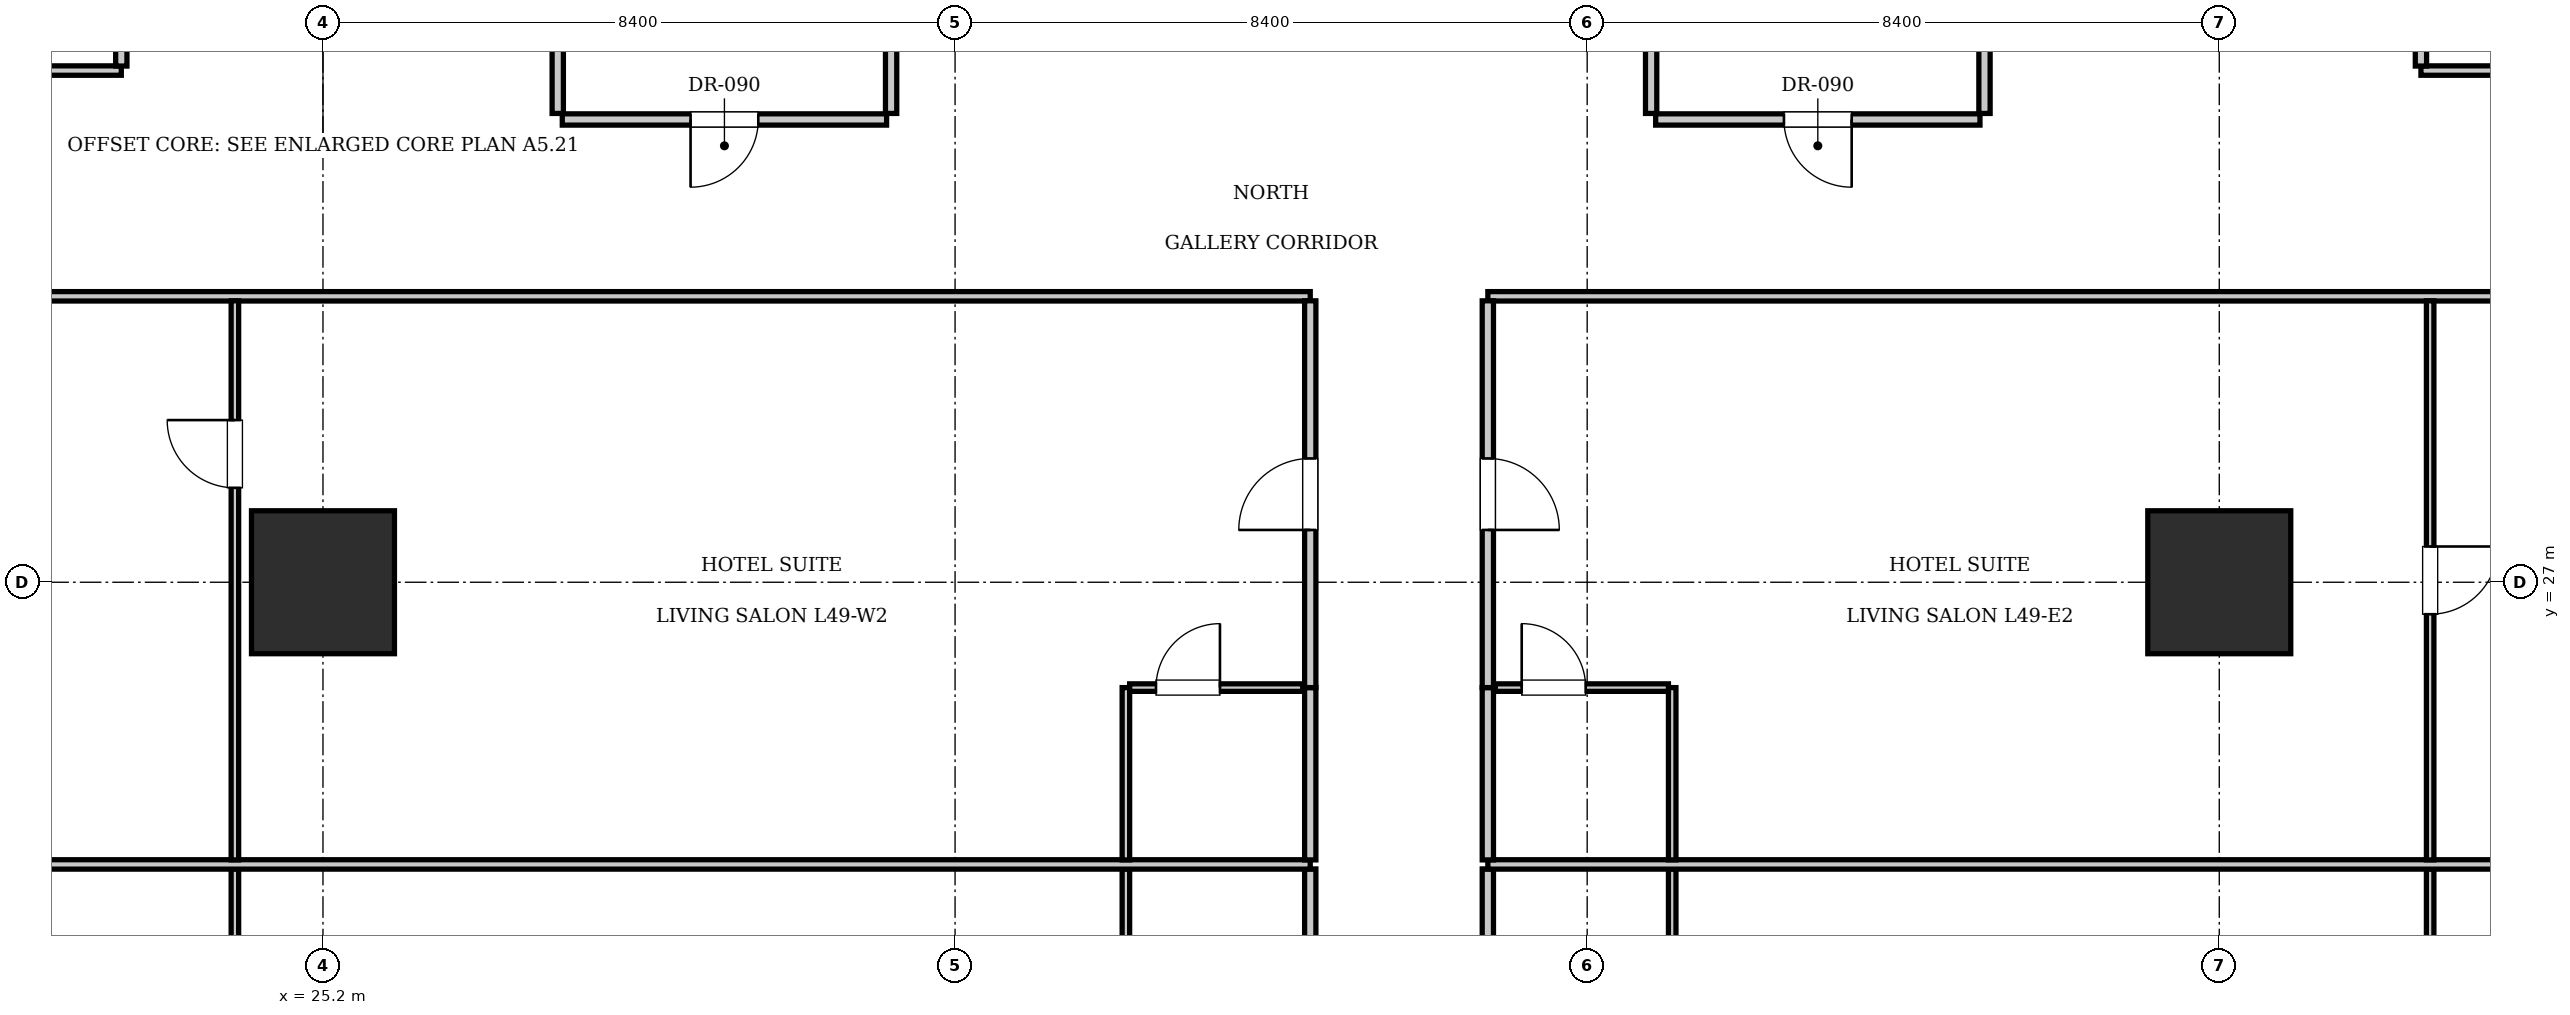
"""IFC4 building model, lengths in metres.
Left out: names, types, materials, properties, quantities, classifications, styles, units other than length and angle.
Written with IfcOpenShell. Run it as: python <this file> out.ifc"""

import sys

from ifc_helpers import new_model, si_unit, direction, frame, frame_2d, origin, origin_2d, place, context, subcontext, project, spatial, rectangle, extrude, element, fill, save


model = new_model("IFC4")
c1 = context("Model", 3, precision=1e-05, world=origin(), true_north=direction((0.0, 1.0)))
c2 = subcontext(c1, "Body", "Model", "MODEL_VIEW")
j1 = project(units=[si_unit("LENGTHUNIT", "METRE"), si_unit("PLANEANGLEUNIT", "RADIAN")], contexts=[c1])
p1 = place(None, origin())
s1 = spatial("IfcSite", under=j1, at=p1, CompositionType="ELEMENT")
p2 = place(p1, origin())
s2 = spatial("IfcBuilding", under=s1, at=p2, CompositionType="ELEMENT")
p3 = place(p2, frame((0.0, 0.0, 200.55)))
s3 = spatial("IfcBuildingStorey", under=s2, at=p3, CompositionType="ELEMENT", Elevation=200.55)
for number, where, z_axis, x_axis in (
    (1, (25.2, 27.0, 0.0), (0.0, 0.0, 1.0), (1.0, 0.0, 0.0)),
    (2, (50.4, 27.0, 0.0), (0.0, 0.0, 1.0), (1.0, 0.0, 0.0)),
):
    element("IfcColumn", number, at=place(p3, frame(where, z_axis=z_axis, x_axis=x_axis)), inside=s3, PredefinedType="COLUMN", context=c2, shape_type="SweptSolid", body=[
        extrude(rectangle(XDim=1.9, YDim=1.9, at=origin_2d()), origin(), (0.0, 0.0, 1.0), 3.85),
    ])
for number, where, z_axis, x_axis in (
    (3, (28.32, 33.23, 0.0), (0.0, 0.0, 1.0), (0.0, 1.0, 0.0)),
    (4, (32.75, 33.23, 0.0), (0.0, 0.0, 1.0), (0.0, 1.0, 0.0)),
):
    element("IfcWall", number, at=place(p3, frame(where, z_axis=z_axis, x_axis=x_axis)), inside=s3, PredefinedType="PARTITIONING", context=c2, shape_type="SweptSolid", body=[
        extrude(rectangle(XDim=2.89, YDim=0.15, at=frame_2d((1.445, 0.0))), origin(), (0.0, 0.0, 1.0), 3.61),
    ])
p4 = place(p3, frame((28.38, 33.15, 0.0), z_axis=(0.0, 0.0, 1.0), x_axis=(1.0, 0.0, 0.0)))
e5 = element("IfcWall", 5, at=p4, inside=s3, PredefinedType="PARTITIONING", context=c2, shape_type="SweptSolid", body=[
    extrude(rectangle(XDim=4.31, YDim=0.15, at=frame_2d((2.155, 0.0))), origin(), (0.0, 0.0, 1.0), 3.61),
])
p5 = place(p4, frame((1.705, 0.0, 0.0)))
e6 = element("IfcOpeningElement", 6, at=p5, cuts=e5, PredefinedType="OPENING", context=c2, shape_type="SweptSolid", body=[
    extrude(rectangle(XDim=0.9, YDim=2.1, at=frame_2d((0.45, 1.05))), frame((0.0, 0.085, 0.0), z_axis=(0.0, -1.0, 0.0), x_axis=(1.0, 0.0, 0.0)), (0.0, 0.0, 1.0), 0.17),
])
for number, where, z_axis, x_axis in (
    (7, (42.85, 33.23, 0.0), (0.0, 0.0, 1.0), (0.0, 1.0, 0.0)),
    (8, (47.28, 33.23, 0.0), (0.0, 0.0, 1.0), (0.0, 1.0, 0.0)),
):
    element("IfcWall", number, at=place(p3, frame(where, z_axis=z_axis, x_axis=x_axis)), inside=s3, PredefinedType="PARTITIONING", context=c2, shape_type="SweptSolid", body=[
        extrude(rectangle(XDim=2.89, YDim=0.15, at=frame_2d((1.445, 0.0))), origin(), (0.0, 0.0, 1.0), 3.61),
    ])
p6 = place(p3, frame((42.91, 33.15, 0.0), z_axis=(0.0, 0.0, 1.0), x_axis=(1.0, 0.0, 0.0)))
e9 = element("IfcWall", 9, at=p6, inside=s3, PredefinedType="PARTITIONING", context=c2, shape_type="SweptSolid", body=[
    extrude(rectangle(XDim=4.31, YDim=0.15, at=frame_2d((2.155, 0.0))), origin(), (0.0, 0.0, 1.0), 3.61),
])
p7 = place(p6, frame((1.705, 0.0, 0.0)))
e10 = element("IfcOpeningElement", 10, at=p7, cuts=e9, PredefinedType="OPENING", context=c2, shape_type="SweptSolid", body=[
    extrude(rectangle(XDim=0.9, YDim=2.1, at=frame_2d((0.45, 1.05))), frame((0.0, 0.085, 0.0), z_axis=(0.0, -1.0, 0.0), x_axis=(1.0, 0.0, 0.0)), (0.0, 0.0, 1.0), 0.17),
])
p8 = place(p3, frame((13.2, 30.8, 0.0), z_axis=(0.0, 0.0, 1.0), x_axis=(1.0, 0.0, 0.0)))
e11 = element("IfcWall", 11, at=p8, inside=s3, PredefinedType="PARTITIONING", context=c2, shape_type="SweptSolid", body=[
    extrude(rectangle(XDim=25.12, YDim=0.125, at=frame_2d((12.56, 0.0))), origin(), (0.0, 0.0, 1.0), 3.61),
])
p9 = place(p3, frame((40.68, 30.8, 0.0), z_axis=(0.0, 0.0, 1.0), x_axis=(1.0, 0.0, 0.0)))
e12 = element("IfcWall", 12, at=p9, inside=s3, PredefinedType="PARTITIONING", context=c2, shape_type="SweptSolid", body=[
    extrude(rectangle(XDim=21.72, YDim=0.125, at=frame_2d((10.86, 0.0))), origin(), (0.0, 0.0, 1.0), 3.61),
])
p10 = place(p3, frame((38.32, 20.9, 0.0), z_axis=(0.0, 0.0, 1.0), x_axis=(0.0, 1.0, 0.0)))
e13 = element("IfcWall", 13, at=p10, inside=s3, PredefinedType="PARTITIONING", context=c2, shape_type="SweptSolid", body=[
    extrude(rectangle(XDim=2.29, YDim=0.15, at=frame_2d((1.145, 0.0))), origin(), (0.0, 0.0, 1.0), 3.61),
])
p11 = place(p3, frame((35.87, 20.9, 0.0), z_axis=(0.0, 0.0, 1.0), x_axis=(0.0, 1.0, 0.0)))
e14 = element("IfcWall", 14, at=p11, inside=s3, PredefinedType="PARTITIONING", context=c2, shape_type="SweptSolid", body=[
    extrude(rectangle(XDim=2.29, YDim=0.1, at=frame_2d((1.145, 0.0))), origin(), (0.0, 0.0, 1.0), 3.61),
])
p12 = place(p3, frame((24.03, 15.76, 0.0), z_axis=(0.0, 0.0, 1.0), x_axis=(0.0, 1.0, 0.0)))
e15 = element("IfcWall", 15, at=p12, inside=s3, PredefinedType="PARTITIONING", context=c2, shape_type="SweptSolid", body=[
    extrude(rectangle(XDim=7.43, YDim=0.1, at=frame_2d((3.715, 0.0))), origin(), (0.0, 0.0, 1.0), 3.61),
])
p13 = place(p12, frame((3.265, 0.0, 0.0)))
e16 = element("IfcOpeningElement", 16, at=p13, cuts=e15, PredefinedType="OPENING", context=c2, shape_type="SweptSolid", body=[
    extrude(rectangle(XDim=0.9, YDim=2.1, at=frame_2d((0.45, 1.05))), frame((0.0, 0.06, 0.0), z_axis=(0.0, -1.0, 0.0), x_axis=(1.0, 0.0, 0.0)), (0.0, 0.0, 1.0), 0.12),
])
p14 = place(p3, frame((40.68, 20.9, 0.0), z_axis=(0.0, 0.0, 1.0), x_axis=(0.0, 1.0, 0.0)))
e17 = element("IfcWall", 17, at=p14, inside=s3, PredefinedType="PARTITIONING", context=c2, shape_type="SweptSolid", body=[
    extrude(rectangle(XDim=2.29, YDim=0.15, at=frame_2d((1.145, 0.0))), origin(), (0.0, 0.0, 1.0), 3.61),
])
p15 = place(p3, frame((43.13, 20.9, 0.0), z_axis=(0.0, 0.0, 1.0), x_axis=(0.0, 1.0, 0.0)))
e18 = element("IfcWall", 18, at=p15, inside=s3, PredefinedType="PARTITIONING", context=c2, shape_type="SweptSolid", body=[
    extrude(rectangle(XDim=2.29, YDim=0.1, at=frame_2d((1.145, 0.0))), origin(), (0.0, 0.0, 1.0), 3.61),
])
p16 = place(p3, frame((53.202, 15.76, 0.0), z_axis=(0.0, 0.0, 1.0), x_axis=(0.0, 1.0, 0.0)))
e19 = element("IfcWall", 19, at=p16, inside=s3, PredefinedType="PARTITIONING", context=c2, shape_type="SweptSolid", body=[
    extrude(rectangle(XDim=7.43, YDim=0.1, at=frame_2d((3.715, 0.0))), origin(), (0.0, 0.0, 1.0), 3.61),
])
p17 = place(p16, frame((3.265, 0.0, 0.0)))
e20 = element("IfcOpeningElement", 20, at=p17, cuts=e19, PredefinedType="OPENING", context=c2, shape_type="SweptSolid", body=[
    extrude(rectangle(XDim=0.9, YDim=2.1, at=frame_2d((0.45, 1.05))), frame((0.0, 0.06, 0.0), z_axis=(0.0, -1.0, 0.0), x_axis=(1.0, 0.0, 0.0)), (0.0, 0.0, 1.0), 0.12),
])
p18 = place(p3, frame((13.2, 23.25, 0.0), z_axis=(0.0, 0.0, 1.0), x_axis=(1.0, 0.0, 0.0)))
e21 = element("IfcWall", 21, at=p18, inside=s3, PredefinedType="PARTITIONING", context=c2, shape_type="SweptSolid", body=[
    extrude(rectangle(XDim=25.12, YDim=0.125, at=frame_2d((12.56, 0.0))), origin(), (0.0, 0.0, 1.0), 3.61),
])
p19 = place(p3, frame((40.68, 23.25, 0.0), z_axis=(0.0, 0.0, 1.0), x_axis=(1.0, 0.0, 0.0)))
e22 = element("IfcWall", 22, at=p19, inside=s3, PredefinedType="PARTITIONING", context=c2, shape_type="SweptSolid", body=[
    extrude(rectangle(XDim=21.72, YDim=0.125, at=frame_2d((10.86, 0.0))), origin(), (0.0, 0.0, 1.0), 3.61),
])
p20 = place(p3, frame((38.32, 23.31, 0.0), z_axis=(0.0, 0.0, 1.0), x_axis=(0.0, 1.0, 0.0)))
e23 = element("IfcWall", 23, at=p20, inside=s3, PredefinedType="PARTITIONING", context=c2, shape_type="SweptSolid", body=[
    extrude(rectangle(XDim=2.29, YDim=0.15, at=frame_2d((1.145, 0.0))), origin(), (0.0, 0.0, 1.0), 3.61),
])
p21 = place(p3, frame((38.32, 25.6, 0.0), z_axis=(0.0, 0.0, 1.0), x_axis=(0.0, 1.0, 0.0)))
e24 = element("IfcWall", 24, at=p21, inside=s3, PredefinedType="PARTITIONING", context=c2, shape_type="SweptSolid", body=[
    extrude(rectangle(XDim=5.14, YDim=0.15, at=frame_2d((2.57, 0.0))), origin(), (0.0, 0.0, 1.0), 3.61),
])
p22 = place(p21, frame((2.095, 0.0, 0.0)))
e25 = element("IfcOpeningElement", 25, at=p22, cuts=e24, PredefinedType="OPENING", context=c2, shape_type="SweptSolid", body=[
    extrude(rectangle(XDim=0.95, YDim=2.15, at=frame_2d((0.475, 1.075))), frame((0.0, 0.085, 0.0), z_axis=(0.0, -1.0, 0.0), x_axis=(1.0, 0.0, 0.0)), (0.0, 0.0, 1.0), 0.17),
])
p23 = place(p3, frame((35.87, 23.31, 0.0), z_axis=(0.0, 0.0, 1.0), x_axis=(0.0, 1.0, 0.0)))
e26 = element("IfcWall", 26, at=p23, inside=s3, PredefinedType="PARTITIONING", context=c2, shape_type="SweptSolid", body=[
    extrude(rectangle(XDim=2.29, YDim=0.1, at=frame_2d((1.145, 0.0))), origin(), (0.0, 0.0, 1.0), 3.61),
])
p24 = place(p3, frame((35.92, 25.6, 0.0), z_axis=(0.0, 0.0, 1.0), x_axis=(1.0, 0.0, 0.0)))
e27 = element("IfcWall", 27, at=p24, inside=s3, PredefinedType="PARTITIONING", context=c2, shape_type="SweptSolid", body=[
    extrude(rectangle(XDim=2.3, YDim=0.1, at=frame_2d((1.15, 0.0))), origin(), (0.0, 0.0, 1.0), 3.61),
])
p25 = place(p24, frame((0.35, 0.0, 0.0)))
e28 = element("IfcOpeningElement", 28, at=p25, cuts=e27, PredefinedType="OPENING", context=c2, shape_type="SweptSolid", body=[
    extrude(rectangle(XDim=0.85, YDim=2.1, at=frame_2d((0.425, 1.05))), frame((0.0, 0.06, 0.0), z_axis=(0.0, -1.0, 0.0), x_axis=(1.0, 0.0, 0.0)), (0.0, 0.0, 1.0), 0.12),
])
p26 = place(p3, frame((24.03, 23.31, 0.0), z_axis=(0.0, 0.0, 1.0), x_axis=(0.0, 1.0, 0.0)))
e29 = element("IfcWall", 29, at=p26, inside=s3, PredefinedType="PARTITIONING", context=c2, shape_type="SweptSolid", body=[
    extrude(rectangle(XDim=7.43, YDim=0.1, at=frame_2d((3.715, 0.0))), origin(), (0.0, 0.0, 1.0), 3.61),
])
p27 = place(p26, frame((4.945, 0.0, 0.0)))
e30 = element("IfcOpeningElement", 30, at=p27, cuts=e29, PredefinedType="OPENING", context=c2, shape_type="SweptSolid", body=[
    extrude(rectangle(XDim=0.9, YDim=2.1, at=frame_2d((0.45, 1.05))), frame((0.0, 0.06, 0.0), z_axis=(0.0, -1.0, 0.0), x_axis=(1.0, 0.0, 0.0)), (0.0, 0.0, 1.0), 0.12),
])
p28 = place(p3, frame((40.68, 23.31, 0.0), z_axis=(0.0, 0.0, 1.0), x_axis=(0.0, 1.0, 0.0)))
e31 = element("IfcWall", 31, at=p28, inside=s3, PredefinedType="PARTITIONING", context=c2, shape_type="SweptSolid", body=[
    extrude(rectangle(XDim=2.29, YDim=0.15, at=frame_2d((1.145, 0.0))), origin(), (0.0, 0.0, 1.0), 3.61),
])
p29 = place(p3, frame((40.68, 25.6, 0.0), z_axis=(0.0, 0.0, 1.0), x_axis=(0.0, 1.0, 0.0)))
e32 = element("IfcWall", 32, at=p29, inside=s3, PredefinedType="PARTITIONING", context=c2, shape_type="SweptSolid", body=[
    extrude(rectangle(XDim=5.14, YDim=0.15, at=frame_2d((2.57, 0.0))), origin(), (0.0, 0.0, 1.0), 3.61),
])
p30 = place(p29, frame((2.095, 0.0, 0.0)))
e33 = element("IfcOpeningElement", 33, at=p30, cuts=e32, PredefinedType="OPENING", context=c2, shape_type="SweptSolid", body=[
    extrude(rectangle(XDim=0.95, YDim=2.15, at=frame_2d((0.475, 1.075))), frame((0.0, 0.085, 0.0), z_axis=(0.0, -1.0, 0.0), x_axis=(1.0, 0.0, 0.0)), (0.0, 0.0, 1.0), 0.17),
])
p31 = place(p3, frame((43.13, 23.31, 0.0), z_axis=(0.0, 0.0, 1.0), x_axis=(0.0, 1.0, 0.0)))
e34 = element("IfcWall", 34, at=p31, inside=s3, PredefinedType="PARTITIONING", context=c2, shape_type="SweptSolid", body=[
    extrude(rectangle(XDim=2.29, YDim=0.1, at=frame_2d((1.145, 0.0))), origin(), (0.0, 0.0, 1.0), 3.61),
])
p32 = place(p3, frame((40.78, 25.6, 0.0), z_axis=(0.0, 0.0, 1.0), x_axis=(1.0, 0.0, 0.0)))
e35 = element("IfcWall", 35, at=p32, inside=s3, PredefinedType="PARTITIONING", context=c2, shape_type="SweptSolid", body=[
    extrude(rectangle(XDim=2.3, YDim=0.1, at=frame_2d((1.15, 0.0))), origin(), (0.0, 0.0, 1.0), 3.61),
])
p33 = place(p32, frame((0.35, 0.0, 0.0)))
e36 = element("IfcOpeningElement", 36, at=p33, cuts=e35, PredefinedType="OPENING", context=c2, shape_type="SweptSolid", body=[
    extrude(rectangle(XDim=0.85, YDim=2.1, at=frame_2d((0.425, 1.05))), frame((0.0, 0.06, 0.0), z_axis=(0.0, -1.0, 0.0), x_axis=(1.0, 0.0, 0.0)), (0.0, 0.0, 1.0), 0.12),
])
p34 = place(p3, frame((53.202, 23.31, 0.0), z_axis=(0.0, 0.0, 1.0), x_axis=(0.0, 1.0, 0.0)))
e37 = element("IfcWall", 37, at=p34, inside=s3, PredefinedType="PARTITIONING", context=c2, shape_type="SweptSolid", body=[
    extrude(rectangle(XDim=7.43, YDim=0.1, at=frame_2d((3.715, 0.0))), origin(), (0.0, 0.0, 1.0), 3.61),
])
p35 = place(p34, frame((3.265, 0.0, 0.0)))
e38 = element("IfcOpeningElement", 38, at=p35, cuts=e37, PredefinedType="OPENING", context=c2, shape_type="SweptSolid", body=[
    extrude(rectangle(XDim=0.9, YDim=2.1, at=frame_2d((0.45, 1.05))), frame((0.0, 0.06, 0.0), z_axis=(0.0, -1.0, 0.0), x_axis=(1.0, 0.0, 0.0)), (0.0, 0.0, 1.0), 0.12),
])
p36 = place(p3, frame((13.2, 33.8, 0.0), z_axis=(0.0, 0.0, 1.0), x_axis=(1.0, 0.0, 0.0)))
e39 = element("IfcWall", 39, at=p36, inside=s3, PredefinedType="PARTITIONING", context=c2, shape_type="SweptSolid", body=[
    extrude(rectangle(XDim=9.32, YDim=0.125, at=frame_2d((4.66, 0.0))), origin(), (0.0, 0.0, 1.0), 3.61),
])
p37 = place(p3, frame((53.08, 33.8, 0.0), z_axis=(0.0, 0.0, 1.0), x_axis=(1.0, 0.0, 0.0)))
e40 = element("IfcWall", 40, at=p37, inside=s3, PredefinedType="PARTITIONING", context=c2, shape_type="SweptSolid", body=[
    extrude(rectangle(XDim=9.32, YDim=0.125, at=frame_2d((4.66, 0.0))), origin(), (0.0, 0.0, 1.0), 3.61),
])
p38 = place(p3, frame((22.52, 33.86, 0.0), z_axis=(0.0, 0.0, 1.0), x_axis=(0.0, 1.0, 0.0)))
e41 = element("IfcWall", 41, at=p38, inside=s3, PredefinedType="PARTITIONING", context=c2, shape_type="SweptSolid", body=[
    extrude(rectangle(XDim=13.327, YDim=0.15, at=frame_2d((6.664, 0.0))), origin(), (0.0, 0.0, 1.0), 3.61),
])
p39 = place(p38, frame((6.189, 0.0, 0.0)))
e42 = element("IfcOpeningElement", 42, at=p39, cuts=e41, PredefinedType="OPENING", context=c2, shape_type="SweptSolid", body=[
    extrude(rectangle(XDim=0.95, YDim=2.15, at=frame_2d((0.475, 1.075))), frame((0.0, 0.085, 0.0), z_axis=(0.0, -1.0, 0.0), x_axis=(1.0, 0.0, 0.0)), (0.0, 0.0, 1.0), 0.17),
])
p40 = place(p3, frame((53.08, 33.86, 0.0), z_axis=(0.0, 0.0, 1.0), x_axis=(0.0, 1.0, 0.0)))
e43 = element("IfcWall", 43, at=p40, inside=s3, PredefinedType="PARTITIONING", context=c2, shape_type="SweptSolid", body=[
    extrude(rectangle(XDim=13.327, YDim=0.15, at=frame_2d((6.664, 0.0))), origin(), (0.0, 0.0, 1.0), 3.61),
])
p41 = place(p40, frame((6.189, 0.0, 0.0)))
e44 = element("IfcOpeningElement", 44, at=p41, cuts=e43, PredefinedType="OPENING", context=c2, shape_type="SweptSolid", body=[
    extrude(rectangle(XDim=0.95, YDim=2.15, at=frame_2d((0.475, 1.075))), frame((0.0, 0.085, 0.0), z_axis=(0.0, -1.0, 0.0), x_axis=(1.0, 0.0, 0.0)), (0.0, 0.0, 1.0), 0.17),
])
p42 = place(p5, frame((0.9, 0.0, 0.0), z_axis=(0.0, 0.0, 1.0), x_axis=(-1.0, 0.0, 0.0)))
e45 = element("IfcDoor", 45, at=p42, inside=s3, OperationType="SINGLE_SWING_RIGHT", PredefinedType="DOOR", context=c2, shape_type="SweptSolid", body=[
    extrude(rectangle(XDim=0.9, YDim=2.1, at=frame_2d((0.45, 1.05))), frame((0.0, 0.025, 0.0), z_axis=(0.0, -1.0, 0.0), x_axis=(1.0, 0.0, 0.0)), (0.0, 0.0, 1.0), 0.05),
])
fill(e6, e45)
p43 = place(p7, frame((0.9, 0.0, 0.0), z_axis=(0.0, 0.0, 1.0), x_axis=(-1.0, 0.0, 0.0)))
e46 = element("IfcDoor", 46, at=p43, inside=s3, OperationType="SINGLE_SWING_LEFT", PredefinedType="DOOR", context=c2, shape_type="SweptSolid", body=[
    extrude(rectangle(XDim=0.9, YDim=2.1, at=frame_2d((0.45, 1.05))), frame((0.0, 0.025, 0.0), z_axis=(0.0, -1.0, 0.0), x_axis=(1.0, 0.0, 0.0)), (0.0, 0.0, 1.0), 0.05),
])
fill(e10, e46)
p44 = place(p25, origin())
e47 = element("IfcDoor", 47, at=p44, inside=s3, OperationType="SINGLE_SWING_RIGHT", PredefinedType="DOOR", context=c2, shape_type="SweptSolid", body=[
    extrude(rectangle(XDim=0.85, YDim=2.1, at=frame_2d((0.425, 1.05))), frame((0.0, 0.025, 0.0), z_axis=(0.0, -1.0, 0.0), x_axis=(1.0, 0.0, 0.0)), (0.0, 0.0, 1.0), 0.05),
])
fill(e28, e47)
p45 = place(p22, origin())
e48 = element("IfcDoor", 48, at=p45, inside=s3, OperationType="SINGLE_SWING_LEFT", PredefinedType="DOOR", context=c2, shape_type="SweptSolid", body=[
    extrude(rectangle(XDim=0.95, YDim=2.15, at=frame_2d((0.475, 1.075))), frame((0.0, 0.025, 0.0), z_axis=(0.0, -1.0, 0.0), x_axis=(1.0, 0.0, 0.0)), (0.0, 0.0, 1.0), 0.05),
])
fill(e25, e48)
p46 = place(p27, origin())
e49 = element("IfcDoor", 49, at=p46, inside=s3, OperationType="SINGLE_SWING_RIGHT", PredefinedType="DOOR", context=c2, shape_type="SweptSolid", body=[
    extrude(rectangle(XDim=0.9, YDim=2.1, at=frame_2d((0.45, 1.05))), frame((0.0, 0.025, 0.0), z_axis=(0.0, -1.0, 0.0), x_axis=(1.0, 0.0, 0.0)), (0.0, 0.0, 1.0), 0.05),
])
fill(e30, e49)
p47 = place(p33, origin())
e50 = element("IfcDoor", 50, at=p47, inside=s3, OperationType="SINGLE_SWING_LEFT", PredefinedType="DOOR", context=c2, shape_type="SweptSolid", body=[
    extrude(rectangle(XDim=0.85, YDim=2.1, at=frame_2d((0.425, 1.05))), frame((0.0, 0.025, 0.0), z_axis=(0.0, -1.0, 0.0), x_axis=(1.0, 0.0, 0.0)), (0.0, 0.0, 1.0), 0.05),
])
fill(e36, e50)
p48 = place(p30, frame((0.95, 0.0, 0.0), z_axis=(0.0, 0.0, 1.0), x_axis=(-1.0, 0.0, 0.0)))
e51 = element("IfcDoor", 51, at=p48, inside=s3, OperationType="SINGLE_SWING_RIGHT", PredefinedType="DOOR", context=c2, shape_type="SweptSolid", body=[
    extrude(rectangle(XDim=0.95, YDim=2.15, at=frame_2d((0.475, 1.075))), frame((0.0, 0.025, 0.0), z_axis=(0.0, -1.0, 0.0), x_axis=(1.0, 0.0, 0.0)), (0.0, 0.0, 1.0), 0.05),
])
fill(e33, e51)
p49 = place(p35, frame((0.9, 0.0, 0.0), z_axis=(0.0, 0.0, 1.0), x_axis=(-1.0, 0.0, 0.0)))
e52 = element("IfcDoor", 52, at=p49, inside=s3, OperationType="SINGLE_SWING_LEFT", PredefinedType="DOOR", context=c2, shape_type="SweptSolid", body=[
    extrude(rectangle(XDim=0.9, YDim=2.1, at=frame_2d((0.45, 1.05))), frame((0.0, 0.025, 0.0), z_axis=(0.0, -1.0, 0.0), x_axis=(1.0, 0.0, 0.0)), (0.0, 0.0, 1.0), 0.05),
])
fill(e38, e52)
save(model, sys.argv[1])
